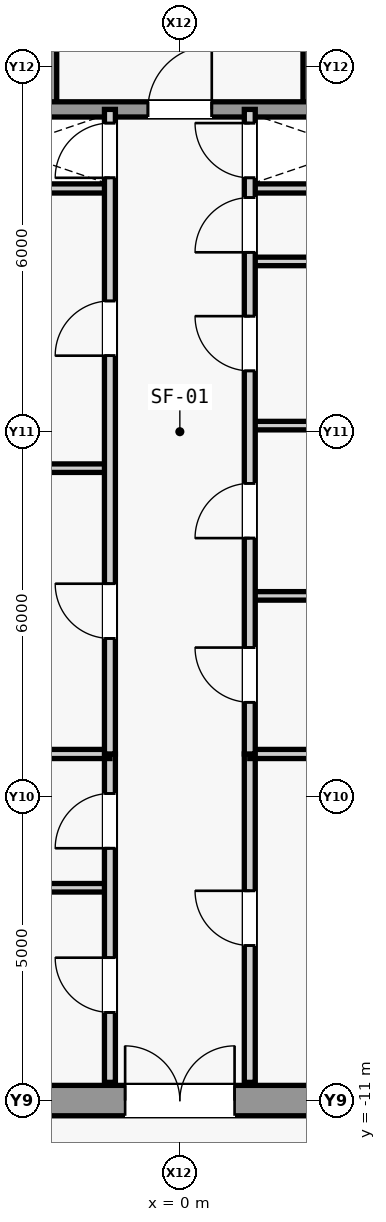
"""IFC4 building model, lengths in metres.
Left out: names, types, materials, properties, quantities, classifications, styles, units other than length and angle.
Written with IfcOpenShell. Run it as: python <this file> out.ifc"""

import sys

from ifc_helpers import new_model, si_unit, direction, frame, frame_2d, origin, place, context, subcontext, project, spatial, rectangle, extrude, source, transform, mapped, element, fill, save


model = new_model("IFC4")
c1 = context("Model", 3, precision=1e-05, world=origin(), true_north=direction((0.0, 1.0)))
c2 = subcontext(c1, "Body", "Model", "MODEL_VIEW")
j1 = project(units=[si_unit("LENGTHUNIT", "METRE"), si_unit("PLANEANGLEUNIT", "RADIAN")], contexts=[c1])
p1 = place(None, origin())
s1 = spatial("IfcSite", under=j1, at=p1, CompositionType="ELEMENT")
p2 = place(p1, origin())
s2 = spatial("IfcBuilding", under=s1, at=p2, CompositionType="ELEMENT")
p3 = place(p2, frame((0.0, 0.0, 268.3)))
s3 = spatial("IfcBuildingStorey", under=s2, at=p3, CompositionType="ELEMENT", Elevation=268.3)
m1 = source(origin(), c2, "Body", "SweptSolid", [
    extrude(rectangle(XDim=9.2, YDim=0.5, at=frame_2d((4.6, 0.0))), origin(), (0.0, 0.0, 1.0), 4.98),
])
p4 = place(p3, frame((-4.6, -11.0, 0.0), z_axis=(0.0, 0.0, 1.0), x_axis=(1.0, 0.0, 0.0)))
e1 = element("IfcWall", 1, at=p4, inside=s3, PredefinedType="SHEAR", context=c2, shape_type="MappedRepresentation", body=[
    mapped(m1, transform((0.0, 0.0, 0.0), scale=1.0)),
])
m2 = source(origin(), c2, "Body", "SweptSolid", [
    extrude(rectangle(XDim=1.8, YDim=2.25, at=frame_2d((0.9, 1.125))), frame((0.0, 0.26, 0.0), z_axis=(0.0, -1.0, 0.0), x_axis=(1.0, 0.0, 0.0)), (0.0, 0.0, 1.0), 0.52),
])
p5 = place(p4, frame((3.7, 0.0, 0.0)))
e2 = element("IfcOpeningElement", 2, at=p5, cuts=e1, PredefinedType="OPENING", context=c2, shape_type="MappedRepresentation", body=[
    mapped(m2, transform((0.0, 0.0, 0.0), scale=1.0)),
])
m3 = source(origin(), c2, "Body", "SweptSolid", [
    extrude(rectangle(XDim=3.45, YDim=0.15, at=frame_2d((1.725, 0.0))), origin(), (0.0, 0.0, 1.0), 4.98),
])
for number, where, z_axis, x_axis in (
    (3, (-4.6, 4.0, 0.0), (0.0, 0.0, 1.0), (1.0, 0.0, 0.0)),
    (4, (1.15, 4.0, 0.0), (0.0, 0.0, 1.0), (1.0, 0.0, 0.0)),
):
    element("IfcWall", number, at=place(p3, frame(where, z_axis=z_axis, x_axis=x_axis)), inside=s3, PredefinedType="PARTITIONING", context=c2, shape_type="MappedRepresentation", body=[
        mapped(m3, transform((0.0, 0.0, 0.0), scale=1.0)),
    ])
m4 = source(origin(), c2, "Body", "SweptSolid", [
    extrude(rectangle(XDim=3.45, YDim=0.14, at=frame_2d((1.725, 0.0))), origin(), (0.0, 0.0, 1.0), 4.98),
])
p6 = place(p3, frame((-4.6, -7.5, 0.0), z_axis=(0.0, 0.0, 1.0), x_axis=(1.0, 0.0, 0.0)))
e5 = element("IfcWall", 5, at=p6, inside=s3, PredefinedType="PARTITIONING", context=c2, shape_type="MappedRepresentation", body=[
    mapped(m4, transform((0.0, 0.0, 0.0), scale=1.0)),
])
m5 = source(origin(), c2, "Body", "SweptSolid", [
    extrude(rectangle(XDim=5.4, YDim=0.18, at=frame_2d((2.7, 0.0))), origin(), (0.0, 0.0, 1.0), 4.98),
])
p7 = place(p3, frame((-1.15, -10.7, 0.0), z_axis=(0.0, 0.0, 1.0), x_axis=(0.0, 1.0, 0.0)))
e6 = element("IfcWall", 6, at=p7, inside=s3, PredefinedType="PARTITIONING", context=c2, shape_type="MappedRepresentation", body=[
    mapped(m5, transform((0.0, 0.0, 0.0), scale=1.0)),
])
m6 = source(origin(), c2, "Body", "SweptSolid", [
    extrude(rectangle(XDim=0.9, YDim=2.15, at=frame_2d((0.45, 1.075))), frame((0.0, 0.1, 0.0), z_axis=(0.0, -1.0, 0.0), x_axis=(1.0, 0.0, 0.0)), (0.0, 0.0, 1.0), 0.2),
])
p8 = place(p7, frame((1.15, 0.0, 0.0)))
e7 = element("IfcOpeningElement", 7, at=p8, cuts=e6, PredefinedType="OPENING", context=c2, shape_type="MappedRepresentation", body=[
    mapped(m6, transform((0.0, 0.0, 0.0), scale=1.0)),
])
p9 = place(p7, frame((3.85, 0.0, 0.0)))
e8 = element("IfcOpeningElement", 8, at=p9, cuts=e6, PredefinedType="OPENING", context=c2, shape_type="MappedRepresentation", body=[
    mapped(m6, transform((0.0, 0.0, 0.0), scale=1.0)),
])
p10 = place(p3, frame((1.15, -10.7, 0.0), z_axis=(0.0, 0.0, 1.0), x_axis=(0.0, 1.0, 0.0)))
e9 = element("IfcWall", 9, at=p10, inside=s3, PredefinedType="PARTITIONING", context=c2, shape_type="MappedRepresentation", body=[
    mapped(m5, transform((0.0, 0.0, 0.0), scale=1.0)),
])
p11 = place(p10, frame((2.25, 0.0, 0.0)))
e10 = element("IfcOpeningElement", 10, at=p11, cuts=e9, PredefinedType="OPENING", context=c2, shape_type="MappedRepresentation", body=[
    mapped(m6, transform((0.0, 0.0, 0.0), scale=1.0)),
])
for number, where, z_axis, x_axis in (
    (11, (-4.6, -5.3, 0.0), (0.0, 0.0, 1.0), (1.0, 0.0, 0.0)),
    (12, (1.15, -5.3, 0.0), (0.0, 0.0, 1.0), (1.0, 0.0, 0.0)),
):
    element("IfcWall", number, at=place(p3, frame(where, z_axis=z_axis, x_axis=x_axis)), inside=s3, PredefinedType="PARTITIONING", context=c2, shape_type="MappedRepresentation", body=[
        mapped(m3, transform((0.0, 0.0, 0.0), scale=1.0)),
    ])
m7 = source(origin(), c2, "Body", "SweptSolid", [
    extrude(rectangle(XDim=5.4, YDim=0.25, at=frame_2d((2.7, 0.0))), origin(), (0.0, 0.0, 1.0), 4.98),
])
for number, where, z_axis, x_axis in (
    (13, (-2.15, 5.3, 0.0), (0.0, 0.0, 1.0), (0.0, 1.0, 0.0)),
    (14, (2.15, 5.3, 0.0), (0.0, 0.0, 1.0), (0.0, 1.0, 0.0)),
):
    element("IfcWall", number, at=place(p3, frame(where, z_axis=z_axis, x_axis=x_axis)), inside=s3, PredefinedType="SHEAR", context=c2, shape_type="MappedRepresentation", body=[
        mapped(m7, transform((0.0, 0.0, 0.0), scale=1.0)),
    ])
m8 = source(origin(), c2, "Body", "SweptSolid", [
    extrude(rectangle(XDim=9.2, YDim=0.25, at=frame_2d((4.6, 0.0))), origin(), (0.0, 0.0, 1.0), 4.98),
])
p12 = place(p3, frame((-4.6, 5.3, 0.0), z_axis=(0.0, 0.0, 1.0), x_axis=(1.0, 0.0, 0.0)))
e15 = element("IfcWall", 15, at=p12, inside=s3, PredefinedType="SHEAR", context=c2, shape_type="MappedRepresentation", body=[
    mapped(m8, transform((0.0, 0.0, 0.0), scale=1.0)),
])
m9 = source(origin(), c2, "Body", "SweptSolid", [
    extrude(rectangle(XDim=1.05, YDim=2.2, at=frame_2d((0.525, 1.1))), frame((0.0, 0.135, 0.0), z_axis=(0.0, -1.0, 0.0), x_axis=(1.0, 0.0, 0.0)), (0.0, 0.0, 1.0), 0.27),
])
p13 = place(p12, frame((4.075, 0.0, 0.0)))
e16 = element("IfcOpeningElement", 16, at=p13, cuts=e15, PredefinedType="OPENING", context=c2, shape_type="MappedRepresentation", body=[
    mapped(m9, transform((0.0, 0.0, 0.0), scale=1.0)),
])
p14 = place(p3, frame((-4.6, -0.6, 0.0), z_axis=(0.0, 0.0, 1.0), x_axis=(1.0, 0.0, 0.0)))
e17 = element("IfcWall", 17, at=p14, inside=s3, PredefinedType="PARTITIONING", context=c2, shape_type="MappedRepresentation", body=[
    mapped(m4, transform((0.0, 0.0, 0.0), scale=1.0)),
])
m10 = source(origin(), c2, "Body", "SweptSolid", [
    extrude(rectangle(XDim=10.6, YDim=0.18, at=frame_2d((5.3, 0.0))), origin(), (0.0, 0.0, 1.0), 4.98),
])
p15 = place(p3, frame((-1.15, -5.3, 0.0), z_axis=(0.0, 0.0, 1.0), x_axis=(0.0, 1.0, 0.0)))
e18 = element("IfcWall", 18, at=p15, inside=s3, PredefinedType="PARTITIONING", context=c2, shape_type="MappedRepresentation", body=[
    mapped(m10, transform((0.0, 0.0, 0.0), scale=1.0)),
])
p16 = place(p15, frame((1.9, 0.0, 0.0)))
e19 = element("IfcOpeningElement", 19, at=p16, cuts=e18, PredefinedType="OPENING", context=c2, shape_type="MappedRepresentation", body=[
    mapped(m6, transform((0.0, 0.0, 0.0), scale=1.0)),
])
p17 = place(p15, frame((6.55, 0.0, 0.0)))
e20 = element("IfcOpeningElement", 20, at=p17, cuts=e18, PredefinedType="OPENING", context=c2, shape_type="MappedRepresentation", body=[
    mapped(m6, transform((0.0, 0.0, 0.0), scale=1.0)),
])
p18 = place(p15, frame((9.475, 0.0, 0.0)))
e21 = element("IfcOpeningElement", 21, at=p18, cuts=e18, PredefinedType="OPENING", context=c2, shape_type="MappedRepresentation", body=[
    mapped(m6, transform((0.0, 0.0, 0.0), scale=1.0)),
])
p19 = place(p3, frame((1.15, -2.7, 0.0), z_axis=(0.0, 0.0, 1.0), x_axis=(1.0, 0.0, 0.0)))
e22 = element("IfcWall", 22, at=p19, inside=s3, PredefinedType="PARTITIONING", context=c2, shape_type="MappedRepresentation", body=[
    mapped(m4, transform((0.0, 0.0, 0.0), scale=1.0)),
])
m11 = source(origin(), c2, "Body", "SweptSolid", [
    extrude(rectangle(XDim=3.45, YDim=0.14, at=frame_2d((1.725, 0.0))), origin(), (0.0, 0.0, 1.0), 4.285),
])
p20 = place(p3, frame((1.15, 0.1, 0.0), z_axis=(0.0, 0.0, 1.0), x_axis=(1.0, 0.0, 0.0)))
e23 = element("IfcWall", 23, at=p20, inside=s3, PredefinedType="PARTITIONING", context=c2, shape_type="MappedRepresentation", body=[
    mapped(m11, transform((0.0, 0.0, 0.0), scale=1.0)),
])
p21 = place(p3, frame((1.15, 2.8, 0.0), z_axis=(0.0, 0.0, 1.0), x_axis=(1.0, 0.0, 0.0)))
e24 = element("IfcWall", 24, at=p21, inside=s3, PredefinedType="PARTITIONING", context=c2, shape_type="MappedRepresentation", body=[
    mapped(m4, transform((0.0, 0.0, 0.0), scale=1.0)),
])
p22 = place(p3, frame((1.15, -5.3, 0.0), z_axis=(0.0, 0.0, 1.0), x_axis=(0.0, 1.0, 0.0)))
e25 = element("IfcWall", 25, at=p22, inside=s3, PredefinedType="PARTITIONING", context=c2, shape_type="MappedRepresentation", body=[
    mapped(m10, transform((0.0, 0.0, 0.0), scale=1.0)),
])
p23 = place(p22, frame((0.85, 0.0, 0.0)))
e26 = element("IfcOpeningElement", 26, at=p23, cuts=e25, PredefinedType="OPENING", context=c2, shape_type="MappedRepresentation", body=[
    mapped(m6, transform((0.0, 0.0, 0.0), scale=1.0)),
])
p24 = place(p22, frame((3.55, 0.0, 0.0)))
e27 = element("IfcOpeningElement", 27, at=p24, cuts=e25, PredefinedType="OPENING", context=c2, shape_type="MappedRepresentation", body=[
    mapped(m6, transform((0.0, 0.0, 0.0), scale=1.0)),
])
p25 = place(p22, frame((6.3, 0.0, 0.0)))
e28 = element("IfcOpeningElement", 28, at=p25, cuts=e25, PredefinedType="OPENING", context=c2, shape_type="MappedRepresentation", body=[
    mapped(m6, transform((0.0, 0.0, 0.0), scale=1.0)),
])
p26 = place(p22, frame((8.25, 0.0, 0.0)))
e29 = element("IfcOpeningElement", 29, at=p26, cuts=e25, PredefinedType="OPENING", context=c2, shape_type="MappedRepresentation", body=[
    mapped(m6, transform((0.0, 0.0, 0.0), scale=1.0)),
])
p27 = place(p22, frame((9.475, 0.0, 0.0)))
e30 = element("IfcOpeningElement", 30, at=p27, cuts=e25, PredefinedType="OPENING", context=c2, shape_type="MappedRepresentation", body=[
    mapped(m6, transform((0.0, 0.0, 0.0), scale=1.0)),
])
m12 = source(origin(), c2, "Body", "SweptSolid", [
    extrude(rectangle(XDim=0.9, YDim=2.15, at=frame_2d((0.45, 1.075))), frame((0.0, 0.025, 0.0), z_axis=(0.0, -1.0, 0.0), x_axis=(1.0, 0.0, 0.0)), (0.0, 0.0, 1.0), 0.05),
])
p28 = place(p8, origin())
e31 = element("IfcDoor", 31, at=p28, inside=s3, OperationType="SINGLE_SWING_RIGHT", PredefinedType="DOOR", context=c2, shape_type="MappedRepresentation", body=[
    mapped(m12, transform((0.0, 0.0, 0.0), scale=1.0)),
])
fill(e7, e31)
p29 = place(p9, origin())
e32 = element("IfcDoor", 32, at=p29, inside=s3, OperationType="SINGLE_SWING_LEFT", PredefinedType="DOOR", context=c2, shape_type="MappedRepresentation", body=[
    mapped(m12, transform((0.0, 0.0, 0.0), scale=1.0)),
])
fill(e8, e32)
p30 = place(p11, origin())
e33 = element("IfcDoor", 33, at=p30, inside=s3, OperationType="SINGLE_SWING_RIGHT", PredefinedType="DOOR", context=c2, shape_type="MappedRepresentation", body=[
    mapped(m12, transform((0.0, 0.0, 0.0), scale=1.0)),
])
fill(e10, e33)
m13 = source(origin(), c2, "Body", "SweptSolid", [
    extrude(rectangle(XDim=1.8, YDim=2.25, at=frame_2d((0.9, 1.125))), frame((0.0, 0.025, 0.0), z_axis=(0.0, -1.0, 0.0), x_axis=(1.0, 0.0, 0.0)), (0.0, 0.0, 1.0), 0.05),
])
p31 = place(p5, origin())
e34 = element("IfcDoor", 34, at=p31, inside=s3, OperationType="SINGLE_SWING_LEFT", PredefinedType="DOOR", context=c2, shape_type="MappedRepresentation", body=[
    mapped(m13, transform((0.0, 0.0, 0.0), scale=1.0)),
])
fill(e2, e34)
m14 = source(origin(), c2, "Body", "SweptSolid", [
    extrude(rectangle(XDim=1.05, YDim=2.2, at=frame_2d((0.525, 1.1))), frame((0.0, 0.025, 0.0), z_axis=(0.0, -1.0, 0.0), x_axis=(1.0, 0.0, 0.0)), (0.0, 0.0, 1.0), 0.05),
])
p32 = place(p13, origin())
e35 = element("IfcDoor", 35, at=p32, inside=s3, OperationType="SINGLE_SWING_RIGHT", PredefinedType="DOOR", context=c2, shape_type="MappedRepresentation", body=[
    mapped(m14, transform((0.0, 0.0, 0.0), scale=1.0)),
])
fill(e16, e35)
p33 = place(p16, origin())
e36 = element("IfcDoor", 36, at=p33, inside=s3, OperationType="SINGLE_SWING_RIGHT", PredefinedType="DOOR", context=c2, shape_type="MappedRepresentation", body=[
    mapped(m12, transform((0.0, 0.0, 0.0), scale=1.0)),
])
fill(e19, e36)
p34 = place(p17, origin())
e37 = element("IfcDoor", 37, at=p34, inside=s3, OperationType="SINGLE_SWING_LEFT", PredefinedType="DOOR", context=c2, shape_type="MappedRepresentation", body=[
    mapped(m12, transform((0.0, 0.0, 0.0), scale=1.0)),
])
fill(e20, e37)
p35 = place(p23, origin())
e38 = element("IfcDoor", 38, at=p35, inside=s3, OperationType="SINGLE_SWING_RIGHT", PredefinedType="DOOR", context=c2, shape_type="MappedRepresentation", body=[
    mapped(m12, transform((0.0, 0.0, 0.0), scale=1.0)),
])
fill(e26, e38)
p36 = place(p24, origin())
e39 = element("IfcDoor", 39, at=p36, inside=s3, OperationType="SINGLE_SWING_LEFT", PredefinedType="DOOR", context=c2, shape_type="MappedRepresentation", body=[
    mapped(m12, transform((0.0, 0.0, 0.0), scale=1.0)),
])
fill(e27, e39)
p37 = place(p25, origin())
e40 = element("IfcDoor", 40, at=p37, inside=s3, OperationType="SINGLE_SWING_RIGHT", PredefinedType="DOOR", context=c2, shape_type="MappedRepresentation", body=[
    mapped(m12, transform((0.0, 0.0, 0.0), scale=1.0)),
])
fill(e28, e40)
p38 = place(p26, origin())
e41 = element("IfcDoor", 41, at=p38, inside=s3, OperationType="SINGLE_SWING_LEFT", PredefinedType="DOOR", context=c2, shape_type="MappedRepresentation", body=[
    mapped(m12, transform((0.0, 0.0, 0.0), scale=1.0)),
])
fill(e29, e41)
p39 = place(p18, origin())
e42 = element("IfcDoor", 42, at=p39, inside=s3, OperationType="SINGLE_SWING_LEFT", PredefinedType="DOOR", context=c2, shape_type="MappedRepresentation", body=[
    mapped(m12, transform((0.0, 0.0, 0.0), scale=1.0)),
])
fill(e21, e42)
p40 = place(p27, origin())
e43 = element("IfcDoor", 43, at=p40, inside=s3, OperationType="SINGLE_SWING_RIGHT", PredefinedType="DOOR", context=c2, shape_type="MappedRepresentation", body=[
    mapped(m12, transform((0.0, 0.0, 0.0), scale=1.0)),
])
fill(e30, e43)
save(model, sys.argv[1])
